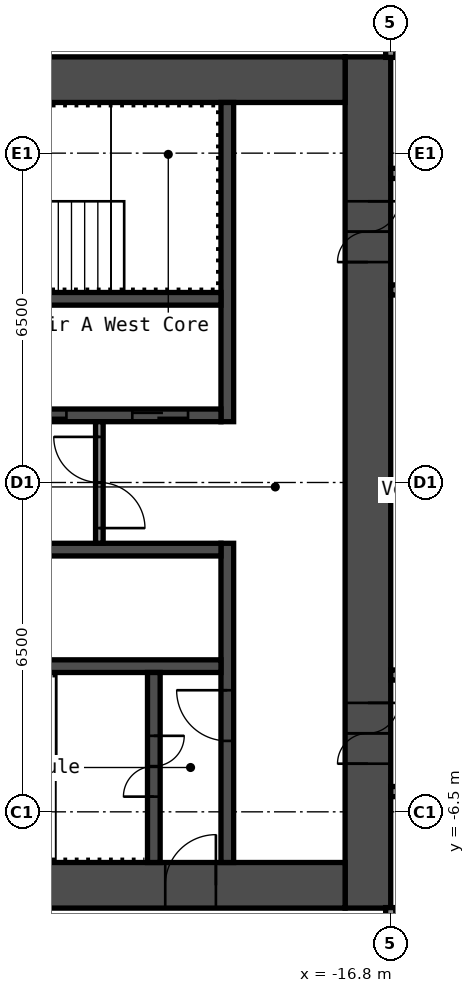
"""IFC4 building model, lengths in metres.
Left out: names, types, materials, properties, quantities, classifications, styles, units other than length and angle.
Written with IfcOpenShell. Run it as: python <this file> out.ifc"""

import sys

from ifc_helpers import new_model, si_unit, direction, frame, frame_2d, origin, place, context, subcontext, project, spatial, rectangle, extrude, element, fill, save


model = new_model("IFC4")
c1 = context("Model", 3, precision=1e-05, world=origin(), true_north=direction((0.0, 1.0)))
c2 = subcontext(c1, "Body", "Model", "MODEL_VIEW")
j1 = project(units=[si_unit("LENGTHUNIT", "METRE"), si_unit("PLANEANGLEUNIT", "RADIAN")], contexts=[c1])
p1 = place(None, origin())
s1 = spatial("IfcSite", under=j1, at=p1, CompositionType="ELEMENT")
p2 = place(p1, origin())
s2 = spatial("IfcBuilding", under=s1, at=p2, CompositionType="ELEMENT")
p3 = place(p2, frame((0.0, 0.0, 58.2)))
s3 = spatial("IfcBuildingStorey", under=s2, at=p3, CompositionType="ELEMENT", Elevation=58.2)
p4 = place(p3, frame((-17.25, -8.4, 0.0), z_axis=(0.0, 0.0, 1.0), x_axis=(0.0, 1.0, 0.0)))
e1 = element("IfcWall", 1, at=p4, inside=s3, PredefinedType="SHEAR", context=c2, shape_type="SweptSolid", body=[
    extrude(rectangle(XDim=16.8, YDim=0.9, at=frame_2d((8.4, 0.0))), origin(), (0.0, 0.0, 1.0), 2.8),
])
p5 = place(p4, frame((12.75, 0.0, 0.0)))
e2 = element("IfcOpeningElement", 2, at=p5, cuts=e1, PredefinedType="OPENING", context=c2, shape_type="SweptSolid", body=[
    extrude(rectangle(XDim=1.2, YDim=2.1, at=frame_2d((0.6, 1.05))), frame((0.0, 0.46, 0.0), z_axis=(0.0, -1.0, 0.0), x_axis=(1.0, 0.0, 0.0)), (0.0, 0.0, 1.0), 0.92),
])
p6 = place(p4, frame((2.85, 0.0, 0.0)))
e3 = element("IfcOpeningElement", 3, at=p6, cuts=e1, PredefinedType="OPENING", context=c2, shape_type="SweptSolid", body=[
    extrude(rectangle(XDim=1.2, YDim=2.1, at=frame_2d((0.6, 1.05))), frame((0.0, 0.46, 0.0), z_axis=(0.0, -1.0, 0.0), x_axis=(1.0, 0.0, 0.0)), (0.0, 0.0, 1.0), 0.92),
])
p7 = place(p3, frame((-32.7, 7.95, 0.0), z_axis=(0.0, 0.0, 1.0), x_axis=(1.0, 0.0, 0.0)))
e4 = element("IfcWall", 4, at=p7, inside=s3, PredefinedType="SHEAR", context=c2, shape_type="SweptSolid", body=[
    extrude(rectangle(XDim=15.0, YDim=0.9, at=frame_2d((7.5, 0.0))), origin(), (0.0, 0.0, 1.0), 2.8),
])
p8 = place(p7, frame((3.4, 0.0, 0.0)))
e5 = element("IfcOpeningElement", 5, at=p8, cuts=e4, PredefinedType="OPENING", context=c2, shape_type="SweptSolid", body=[
    extrude(rectangle(XDim=1.2, YDim=2.1, at=frame_2d((0.6, 1.05))), frame((0.0, 0.46, 0.0), z_axis=(0.0, -1.0, 0.0), x_axis=(1.0, 0.0, 0.0)), (0.0, 0.0, 1.0), 0.92),
])
p9 = place(p7, frame((0.75, 0.0, 0.0)))
e6 = element("IfcOpeningElement", 6, at=p9, cuts=e4, PredefinedType="OPENING", context=c2, shape_type="SweptSolid", body=[
    extrude(rectangle(XDim=0.9, YDim=2.1, at=frame_2d((0.45, 1.05))), frame((0.0, 0.46, 0.0), z_axis=(0.0, -1.0, 0.0), x_axis=(1.0, 0.0, 0.0)), (0.0, 0.0, 1.0), 0.92),
])
p10 = place(p3, frame((-32.7, -7.95, 0.0), z_axis=(0.0, 0.0, 1.0), x_axis=(1.0, 0.0, 0.0)))
e7 = element("IfcWall", 7, at=p10, inside=s3, PredefinedType="SHEAR", context=c2, shape_type="SweptSolid", body=[
    extrude(rectangle(XDim=15.0, YDim=0.9, at=frame_2d((7.5, 0.0))), origin(), (0.0, 0.0, 1.0), 2.8),
])
p11 = place(p10, frame((11.45, 0.0, 0.0)))
e8 = element("IfcOpeningElement", 8, at=p11, cuts=e7, PredefinedType="OPENING", context=c2, shape_type="SweptSolid", body=[
    extrude(rectangle(XDim=1.0, YDim=2.1, at=frame_2d((0.5, 1.05))), frame((0.0, 0.46, 0.0), z_axis=(0.0, -1.0, 0.0), x_axis=(1.0, 0.0, 0.0)), (0.0, 0.0, 1.0), 0.92),
])
p12 = place(p3, frame((-20.025, 1.2, 0.0), z_axis=(0.0, 0.0, 1.0), x_axis=(0.0, 1.0, 0.0)))
e9 = element("IfcWall", 9, at=p12, inside=s3, PredefinedType="SHEAR", context=c2, shape_type="SweptSolid", body=[
    extrude(rectangle(XDim=6.3, YDim=0.25, at=frame_2d((3.15, 0.0))), origin(), (0.0, 0.0, 1.0), 2.8),
])
p13 = place(p3, frame((-20.025, -7.5, 0.0), z_axis=(0.0, 0.0, 1.0), x_axis=(0.0, 1.0, 0.0)))
e10 = element("IfcWall", 10, at=p13, inside=s3, PredefinedType="SHEAR", context=c2, shape_type="SweptSolid", body=[
    extrude(rectangle(XDim=6.3, YDim=0.25, at=frame_2d((3.15, 0.0))), origin(), (0.0, 0.0, 1.0), 2.8),
])
p14 = place(p13, frame((2.4, 0.0, 0.0)))
e11 = element("IfcOpeningElement", 11, at=p14, cuts=e10, PredefinedType="OPENING", context=c2, shape_type="SweptSolid", body=[
    extrude(rectangle(XDim=1.0, YDim=2.1, at=frame_2d((0.5, 1.05))), frame((0.0, 0.135, 0.0), z_axis=(0.0, -1.0, 0.0), x_axis=(1.0, 0.0, 0.0)), (0.0, 0.0, 1.0), 0.27),
])
p15 = place(p3, frame((-27.65, 1.325, 0.0), z_axis=(0.0, 0.0, 1.0), x_axis=(1.0, 0.0, 0.0)))
e12 = element("IfcWall", 12, at=p15, inside=s3, PredefinedType="SHEAR", context=c2, shape_type="SweptSolid", body=[
    extrude(rectangle(XDim=7.5, YDim=0.25, at=frame_2d((3.75, 0.0))), origin(), (0.0, 0.0, 1.0), 2.8),
])
p16 = place(p15, frame((5.75, 0.0, 0.0)))
e13 = element("IfcOpeningElement", 13, at=p16, cuts=e12, PredefinedType="OPENING", context=c2, shape_type="SweptSolid", body=[
    extrude(rectangle(XDim=1.1, YDim=2.1, at=frame_2d((0.55, 1.05))), frame((0.0, 0.135, 0.0), z_axis=(0.0, -1.0, 0.0), x_axis=(1.0, 0.0, 0.0)), (0.0, 0.0, 1.0), 0.27),
])
p17 = place(p15, frame((3.35, 0.0, 0.0)))
e14 = element("IfcOpeningElement", 14, at=p17, cuts=e12, PredefinedType="OPENING", context=c2, shape_type="SweptSolid", body=[
    extrude(rectangle(XDim=1.1, YDim=2.1, at=frame_2d((0.55, 1.05))), frame((0.0, 0.135, 0.0), z_axis=(0.0, -1.0, 0.0), x_axis=(1.0, 0.0, 0.0)), (0.0, 0.0, 1.0), 0.27),
])
p18 = place(p15, frame((0.95, 0.0, 0.0)))
e15 = element("IfcOpeningElement", 15, at=p18, cuts=e12, PredefinedType="OPENING", context=c2, shape_type="SweptSolid", body=[
    extrude(rectangle(XDim=1.1, YDim=2.1, at=frame_2d((0.55, 1.05))), frame((0.0, 0.135, 0.0), z_axis=(0.0, -1.0, 0.0), x_axis=(1.0, 0.0, 0.0)), (0.0, 0.0, 1.0), 0.27),
])
for number, where, z_axis, x_axis in (
    (16, (-27.65, 3.625, 0.0), (0.0, 0.0, 1.0), (1.0, 0.0, 0.0)),
    (17, (-27.65, -1.325, 0.0), (0.0, 0.0, 1.0), (1.0, 0.0, 0.0)),
    (18, (-27.65, -3.625, 0.0), (0.0, 0.0, 1.0), (1.0, 0.0, 0.0)),
):
    element("IfcWall", number, at=place(p3, frame(where, z_axis=z_axis, x_axis=x_axis)), inside=s3, PredefinedType="SHEAR", context=c2, shape_type="SweptSolid", body=[
        extrude(rectangle(XDim=7.5, YDim=0.25, at=frame_2d((3.75, 0.0))), origin(), (0.0, 0.0, 1.0), 2.8),
    ])
p19 = place(p3, frame((-21.475, -7.5, 0.0), z_axis=(0.0, 0.0, 1.0), x_axis=(0.0, 1.0, 0.0)))
e19 = element("IfcWall", 19, at=p19, inside=s3, PredefinedType="SHEAR", context=c2, shape_type="SweptSolid", body=[
    extrude(rectangle(XDim=3.75, YDim=0.25, at=frame_2d((1.875, 0.0))), origin(), (0.0, 0.0, 1.0), 2.8),
])
p20 = place(p19, frame((1.3, 0.0, 0.0)))
e20 = element("IfcOpeningElement", 20, at=p20, cuts=e19, PredefinedType="OPENING", context=c2, shape_type="SweptSolid", body=[
    extrude(rectangle(XDim=1.2, YDim=2.1, at=frame_2d((0.6, 1.05))), frame((0.0, 0.135, 0.0), z_axis=(0.0, -1.0, 0.0), x_axis=(1.0, 0.0, 0.0)), (0.0, 0.0, 1.0), 0.27),
])
p21 = place(p3, frame((-22.55, -1.2, 0.0), z_axis=(0.0, 0.0, 1.0), x_axis=(0.0, 1.0, 0.0)))
e21 = element("IfcWall", 21, at=p21, inside=s3, PredefinedType="PARTITIONING", context=c2, shape_type="SweptSolid", body=[
    extrude(rectangle(XDim=2.4, YDim=0.15, at=frame_2d((1.2, 0.0))), origin(), (0.0, 0.0, 1.0), 2.8),
])
p22 = place(p21, frame((0.3, 0.0, 0.0)))
e22 = element("IfcOpeningElement", 22, at=p22, cuts=e21, PredefinedType="OPENING", context=c2, shape_type="SweptSolid", body=[
    extrude(rectangle(XDim=1.8, YDim=2.1, at=frame_2d((0.9, 1.05))), frame((0.0, 0.085, 0.0), z_axis=(0.0, -1.0, 0.0), x_axis=(1.0, 0.0, 0.0)), (0.0, 0.0, 1.0), 0.17),
])
p23 = place(p3, frame((-16.8, -6.1, 0.0), z_axis=(0.0, 0.0, 1.0), x_axis=(1.0, 0.0, 0.0)))
e23 = element("IfcWall", 23, at=p23, inside=s3, PredefinedType="PARTITIONING", context=c2, shape_type="SweptSolid", body=[
    extrude(rectangle(XDim=33.6, YDim=0.2, at=frame_2d((16.8, 0.0))), origin(), (0.0, 0.0, 1.0), 2.8),
])
p24 = place(p23, frame((2.0, 0.0, 0.0)))
e24 = element("IfcOpeningElement", 24, at=p24, cuts=e23, PredefinedType="OPENING", context=c2, shape_type="SweptSolid", body=[
    extrude(rectangle(XDim=1.0, YDim=2.1, at=frame_2d((0.5, 1.05))), frame((0.0, 0.11, 0.0), z_axis=(0.0, -1.0, 0.0), x_axis=(1.0, 0.0, 0.0)), (0.0, 0.0, 1.0), 0.22),
])
p25 = place(p23, frame((11.25, 0.0, 0.0)))
e25 = element("IfcOpeningElement", 25, at=p25, cuts=e23, PredefinedType="OPENING", context=c2, shape_type="SweptSolid", body=[
    extrude(rectangle(XDim=1.0, YDim=2.1, at=frame_2d((0.5, 1.05))), frame((0.0, 0.11, 0.0), z_axis=(0.0, -1.0, 0.0), x_axis=(1.0, 0.0, 0.0)), (0.0, 0.0, 1.0), 0.22),
])
p26 = place(p23, frame((12.95, 0.0, 0.0)))
e26 = element("IfcOpeningElement", 26, at=p26, cuts=e23, PredefinedType="OPENING", context=c2, shape_type="SweptSolid", body=[
    extrude(rectangle(XDim=1.0, YDim=2.1, at=frame_2d((0.5, 1.05))), frame((0.0, 0.11, 0.0), z_axis=(0.0, -1.0, 0.0), x_axis=(1.0, 0.0, 0.0)), (0.0, 0.0, 1.0), 0.22),
])
p27 = place(p23, frame((20.5, 0.0, 0.0)))
e27 = element("IfcOpeningElement", 27, at=p27, cuts=e23, PredefinedType="OPENING", context=c2, shape_type="SweptSolid", body=[
    extrude(rectangle(XDim=1.0, YDim=2.1, at=frame_2d((0.5, 1.05))), frame((0.0, 0.11, 0.0), z_axis=(0.0, -1.0, 0.0), x_axis=(1.0, 0.0, 0.0)), (0.0, 0.0, 1.0), 0.22),
])
p28 = place(p23, frame((28.05, 0.0, 0.0)))
e28 = element("IfcOpeningElement", 28, at=p28, cuts=e23, PredefinedType="OPENING", context=c2, shape_type="SweptSolid", body=[
    extrude(rectangle(XDim=1.0, YDim=2.1, at=frame_2d((0.5, 1.05))), frame((0.0, 0.11, 0.0), z_axis=(0.0, -1.0, 0.0), x_axis=(1.0, 0.0, 0.0)), (0.0, 0.0, 1.0), 0.22),
])
p29 = place(p23, frame((29.75, 0.0, 0.0)))
e29 = element("IfcOpeningElement", 29, at=p29, cuts=e23, PredefinedType="OPENING", context=c2, shape_type="SweptSolid", body=[
    extrude(rectangle(XDim=1.0, YDim=2.1, at=frame_2d((0.5, 1.05))), frame((0.0, 0.11, 0.0), z_axis=(0.0, -1.0, 0.0), x_axis=(1.0, 0.0, 0.0)), (0.0, 0.0, 1.0), 0.22),
])
p30 = place(p3, frame((-16.8, -3.8, 0.0), z_axis=(0.0, 0.0, 1.0), x_axis=(1.0, 0.0, 0.0)))
e30 = element("IfcWall", 30, at=p30, inside=s3, PredefinedType="PARTITIONING", context=c2, shape_type="SweptSolid", body=[
    extrude(rectangle(XDim=33.6, YDim=0.2, at=frame_2d((16.8, 0.0))), origin(), (0.0, 0.0, 1.0), 2.8),
])
p31 = place(p30, frame((9.63, 0.0, 0.0)))
e31 = element("IfcOpeningElement", 31, at=p31, cuts=e30, PredefinedType="OPENING", context=c2, shape_type="SweptSolid", body=[
    extrude(rectangle(XDim=0.9, YDim=2.1, at=frame_2d((0.45, 1.05))), frame((0.0, 0.11, 0.0), z_axis=(0.0, -1.0, 0.0), x_axis=(1.0, 0.0, 0.0)), (0.0, 0.0, 1.0), 0.22),
])
p32 = place(p30, frame((13.83, 0.0, 0.0)))
e32 = element("IfcOpeningElement", 32, at=p32, cuts=e30, PredefinedType="OPENING", context=c2, shape_type="SweptSolid", body=[
    extrude(rectangle(XDim=0.9, YDim=2.1, at=frame_2d((0.45, 1.05))), frame((0.0, 0.11, 0.0), z_axis=(0.0, -1.0, 0.0), x_axis=(1.0, 0.0, 0.0)), (0.0, 0.0, 1.0), 0.22),
])
p33 = place(p30, frame((27.355, 0.0, 0.0)))
e33 = element("IfcOpeningElement", 33, at=p33, cuts=e30, PredefinedType="OPENING", context=c2, shape_type="SweptSolid", body=[
    extrude(rectangle(XDim=0.9, YDim=2.1, at=frame_2d((0.45, 1.05))), frame((0.0, 0.11, 0.0), z_axis=(0.0, -1.0, 0.0), x_axis=(1.0, 0.0, 0.0)), (0.0, 0.0, 1.0), 0.22),
])
p34 = place(p30, frame((31.555, 0.0, 0.0)))
e34 = element("IfcOpeningElement", 34, at=p34, cuts=e30, PredefinedType="OPENING", context=c2, shape_type="SweptSolid", body=[
    extrude(rectangle(XDim=0.9, YDim=2.1, at=frame_2d((0.45, 1.05))), frame((0.0, 0.11, 0.0), z_axis=(0.0, -1.0, 0.0), x_axis=(1.0, 0.0, 0.0)), (0.0, 0.0, 1.0), 0.22),
])
p35 = place(p3, frame((-16.8, 3.8, 0.0), z_axis=(0.0, 0.0, 1.0), x_axis=(1.0, 0.0, 0.0)))
e35 = element("IfcWall", 35, at=p35, inside=s3, PredefinedType="PARTITIONING", context=c2, shape_type="SweptSolid", body=[
    extrude(rectangle(XDim=33.6, YDim=0.2, at=frame_2d((16.8, 0.0))), origin(), (0.0, 0.0, 1.0), 2.8),
])
p36 = place(p35, frame((1.06, 0.0, 0.0)))
e36 = element("IfcOpeningElement", 36, at=p36, cuts=e35, PredefinedType="OPENING", context=c2, shape_type="SweptSolid", body=[
    extrude(rectangle(XDim=0.9, YDim=2.1, at=frame_2d((0.45, 1.05))), frame((0.0, 0.11, 0.0), z_axis=(0.0, -1.0, 0.0), x_axis=(1.0, 0.0, 0.0)), (0.0, 0.0, 1.0), 0.22),
])
p37 = place(p35, frame((5.26, 0.0, 0.0)))
e37 = element("IfcOpeningElement", 37, at=p37, cuts=e35, PredefinedType="OPENING", context=c2, shape_type="SweptSolid", body=[
    extrude(rectangle(XDim=0.9, YDim=2.1, at=frame_2d((0.45, 1.05))), frame((0.0, 0.11, 0.0), z_axis=(0.0, -1.0, 0.0), x_axis=(1.0, 0.0, 0.0)), (0.0, 0.0, 1.0), 0.22),
])
p38 = place(p35, frame((18.87, 0.0, 0.0)))
e38 = element("IfcOpeningElement", 38, at=p38, cuts=e35, PredefinedType="OPENING", context=c2, shape_type="SweptSolid", body=[
    extrude(rectangle(XDim=0.9, YDim=2.1, at=frame_2d((0.45, 1.05))), frame((0.0, 0.11, 0.0), z_axis=(0.0, -1.0, 0.0), x_axis=(1.0, 0.0, 0.0)), (0.0, 0.0, 1.0), 0.22),
])
p39 = place(p35, frame((23.07, 0.0, 0.0)))
e39 = element("IfcOpeningElement", 39, at=p39, cuts=e35, PredefinedType="OPENING", context=c2, shape_type="SweptSolid", body=[
    extrude(rectangle(XDim=0.9, YDim=2.1, at=frame_2d((0.45, 1.05))), frame((0.0, 0.11, 0.0), z_axis=(0.0, -1.0, 0.0), x_axis=(1.0, 0.0, 0.0)), (0.0, 0.0, 1.0), 0.22),
])
p40 = place(p3, frame((-16.8, 6.1, 0.0), z_axis=(0.0, 0.0, 1.0), x_axis=(1.0, 0.0, 0.0)))
e40 = element("IfcWall", 40, at=p40, inside=s3, PredefinedType="PARTITIONING", context=c2, shape_type="SweptSolid", body=[
    extrude(rectangle(XDim=33.6, YDim=0.2, at=frame_2d((16.8, 0.0))), origin(), (0.0, 0.0, 1.0), 2.8),
])
p41 = place(p40, frame((2.0, 0.0, 0.0)))
e41 = element("IfcOpeningElement", 41, at=p41, cuts=e40, PredefinedType="OPENING", context=c2, shape_type="SweptSolid", body=[
    extrude(rectangle(XDim=1.0, YDim=2.1, at=frame_2d((0.5, 1.05))), frame((0.0, 0.11, 0.0), z_axis=(0.0, -1.0, 0.0), x_axis=(1.0, 0.0, 0.0)), (0.0, 0.0, 1.0), 0.22),
])
p42 = place(p40, frame((11.25, 0.0, 0.0)))
e42 = element("IfcOpeningElement", 42, at=p42, cuts=e40, PredefinedType="OPENING", context=c2, shape_type="SweptSolid", body=[
    extrude(rectangle(XDim=1.0, YDim=2.1, at=frame_2d((0.5, 1.05))), frame((0.0, 0.11, 0.0), z_axis=(0.0, -1.0, 0.0), x_axis=(1.0, 0.0, 0.0)), (0.0, 0.0, 1.0), 0.22),
])
p43 = place(p40, frame((12.95, 0.0, 0.0)))
e43 = element("IfcOpeningElement", 43, at=p43, cuts=e40, PredefinedType="OPENING", context=c2, shape_type="SweptSolid", body=[
    extrude(rectangle(XDim=1.0, YDim=2.1, at=frame_2d((0.5, 1.05))), frame((0.0, 0.11, 0.0), z_axis=(0.0, -1.0, 0.0), x_axis=(1.0, 0.0, 0.0)), (0.0, 0.0, 1.0), 0.22),
])
p44 = place(p40, frame((20.5, 0.0, 0.0)))
e44 = element("IfcOpeningElement", 44, at=p44, cuts=e40, PredefinedType="OPENING", context=c2, shape_type="SweptSolid", body=[
    extrude(rectangle(XDim=1.0, YDim=2.1, at=frame_2d((0.5, 1.05))), frame((0.0, 0.11, 0.0), z_axis=(0.0, -1.0, 0.0), x_axis=(1.0, 0.0, 0.0)), (0.0, 0.0, 1.0), 0.22),
])
p45 = place(p40, frame((28.05, 0.0, 0.0)))
e45 = element("IfcOpeningElement", 45, at=p45, cuts=e40, PredefinedType="OPENING", context=c2, shape_type="SweptSolid", body=[
    extrude(rectangle(XDim=1.0, YDim=2.1, at=frame_2d((0.5, 1.05))), frame((0.0, 0.11, 0.0), z_axis=(0.0, -1.0, 0.0), x_axis=(1.0, 0.0, 0.0)), (0.0, 0.0, 1.0), 0.22),
])
p46 = place(p40, frame((29.75, 0.0, 0.0)))
e46 = element("IfcOpeningElement", 46, at=p46, cuts=e40, PredefinedType="OPENING", context=c2, shape_type="SweptSolid", body=[
    extrude(rectangle(XDim=1.0, YDim=2.1, at=frame_2d((0.5, 1.05))), frame((0.0, 0.11, 0.0), z_axis=(0.0, -1.0, 0.0), x_axis=(1.0, 0.0, 0.0)), (0.0, 0.0, 1.0), 0.22),
])
for number, where, z_axis, x_axis in (
    (47, (-16.8, -20.3, 0.0), (0.0, 0.0, 1.0), (0.0, 1.0, 0.0)),
    (48, (-16.8, 8.39, 0.0), (0.0, 0.0, 1.0), (0.0, 1.0, 0.0)),
):
    element("IfcWall", number, at=place(p3, frame(where, z_axis=z_axis, x_axis=x_axis)), inside=s3, PredefinedType="PARTITIONING", context=c2, shape_type="SweptSolid", body=[
        extrude(rectangle(XDim=11.91, YDim=0.2, at=frame_2d((5.955, 0.0))), origin(), (0.0, 0.0, 1.0), 2.8),
    ])
p47 = place(p5, origin())
e49 = element("IfcDoor", 49, at=p47, inside=s3, OperationType="DOUBLE_DOOR_SINGLE_SWING", PredefinedType="DOOR", context=c2, shape_type="SweptSolid", body=[
    extrude(rectangle(XDim=1.2, YDim=2.1, at=frame_2d((0.6, 1.05))), frame((0.0, 0.025, 0.0), z_axis=(0.0, -1.0, 0.0), x_axis=(1.0, 0.0, 0.0)), (0.0, 0.0, 1.0), 0.05),
])
fill(e2, e49)
p48 = place(p6, origin())
e50 = element("IfcDoor", 50, at=p48, inside=s3, OperationType="DOUBLE_DOOR_SINGLE_SWING", PredefinedType="DOOR", context=c2, shape_type="SweptSolid", body=[
    extrude(rectangle(XDim=1.2, YDim=2.1, at=frame_2d((0.6, 1.05))), frame((0.0, 0.025, 0.0), z_axis=(0.0, -1.0, 0.0), x_axis=(1.0, 0.0, 0.0)), (0.0, 0.0, 1.0), 0.05),
])
fill(e3, e50)
p49 = place(p11, origin())
e51 = element("IfcDoor", 51, at=p49, inside=s3, OperationType="SINGLE_SWING_LEFT", PredefinedType="DOOR", context=c2, shape_type="SweptSolid", body=[
    extrude(rectangle(XDim=1.0, YDim=2.1, at=frame_2d((0.5, 1.05))), frame((0.0, 0.025, 0.0), z_axis=(0.0, -1.0, 0.0), x_axis=(1.0, 0.0, 0.0)), (0.0, 0.0, 1.0), 0.05),
])
fill(e8, e51)
p50 = place(p20, origin())
e52 = element("IfcDoor", 52, at=p50, inside=s3, OperationType="DOUBLE_DOOR_SINGLE_SWING", PredefinedType="DOOR", context=c2, shape_type="SweptSolid", body=[
    extrude(rectangle(XDim=1.2, YDim=2.1, at=frame_2d((0.6, 1.05))), frame((0.0, 0.025, 0.0), z_axis=(0.0, -1.0, 0.0), x_axis=(1.0, 0.0, 0.0)), (0.0, 0.0, 1.0), 0.05),
])
fill(e20, e52)
p51 = place(p14, origin())
e53 = element("IfcDoor", 53, at=p51, inside=s3, OperationType="SINGLE_SWING_LEFT", PredefinedType="DOOR", context=c2, shape_type="SweptSolid", body=[
    extrude(rectangle(XDim=1.0, YDim=2.1, at=frame_2d((0.5, 1.05))), frame((0.0, 0.025, 0.0), z_axis=(0.0, -1.0, 0.0), x_axis=(1.0, 0.0, 0.0)), (0.0, 0.0, 1.0), 0.05),
])
fill(e11, e53)
p52 = place(p22, origin())
e54 = element("IfcDoor", 54, at=p52, inside=s3, OperationType="DOUBLE_DOOR_SINGLE_SWING", PredefinedType="DOOR", context=c2, shape_type="SweptSolid", body=[
    extrude(rectangle(XDim=1.8, YDim=2.1, at=frame_2d((0.9, 1.05))), frame((0.0, 0.025, 0.0), z_axis=(0.0, -1.0, 0.0), x_axis=(1.0, 0.0, 0.0)), (0.0, 0.0, 1.0), 0.05),
])
fill(e22, e54)
p53 = place(p16, origin())
e55 = element("IfcDoor", 55, at=p53, inside=s3, OperationType="DOUBLE_DOOR_SLIDING", PredefinedType="DOOR", context=c2, shape_type="SweptSolid", body=[
    extrude(rectangle(XDim=1.1, YDim=2.1, at=frame_2d((0.55, 1.05))), frame((0.0, 0.025, 0.0), z_axis=(0.0, -1.0, 0.0), x_axis=(1.0, 0.0, 0.0)), (0.0, 0.0, 1.0), 0.05),
])
fill(e13, e55)
p54 = place(p17, origin())
e56 = element("IfcDoor", 56, at=p54, inside=s3, OperationType="DOUBLE_DOOR_SLIDING", PredefinedType="DOOR", context=c2, shape_type="SweptSolid", body=[
    extrude(rectangle(XDim=1.1, YDim=2.1, at=frame_2d((0.55, 1.05))), frame((0.0, 0.025, 0.0), z_axis=(0.0, -1.0, 0.0), x_axis=(1.0, 0.0, 0.0)), (0.0, 0.0, 1.0), 0.05),
])
fill(e14, e56)
save(model, sys.argv[1])
